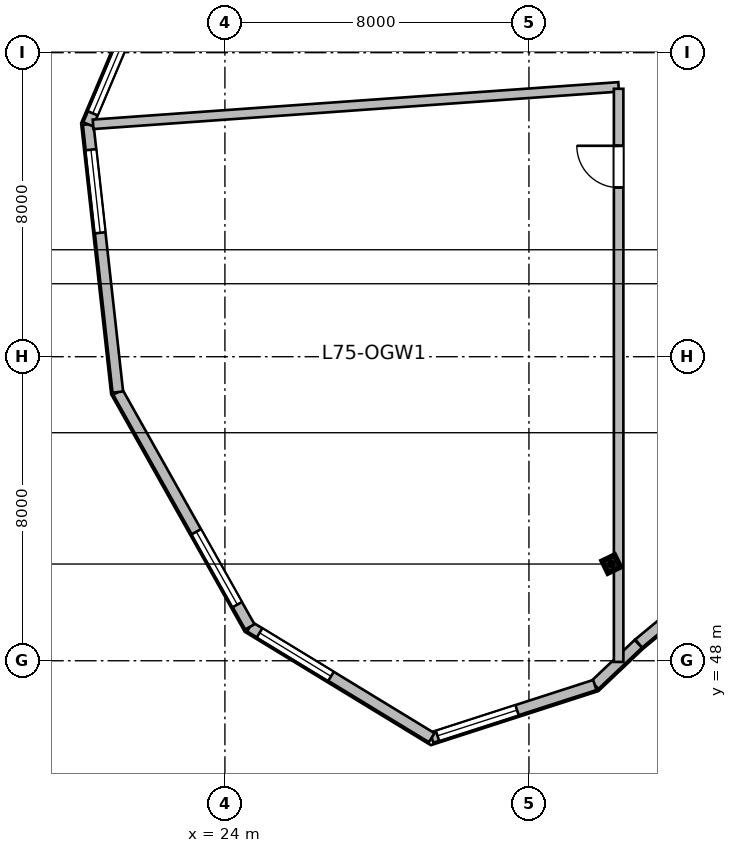
"""IFC4 building model, lengths in metres.
Left out: names, types, materials, properties, quantities, classifications, styles, units other than length and angle.
Written with IfcOpenShell. Run it as: python <this file> out.ifc"""

import sys

from ifc_helpers import new_model, si_unit, direction, frame, frame_2d, origin, origin_2d, place, context, subcontext, project, spatial, rectangle, i_section, extrude, source, transform, mapped, element, fill, save


model = new_model("IFC4")
c1 = context("Model", 3, precision=1e-05, world=origin(), true_north=direction((0.0, 1.0)))
c2 = subcontext(c1, "Body", "Model", "MODEL_VIEW")
j1 = project(units=[si_unit("LENGTHUNIT", "METRE"), si_unit("PLANEANGLEUNIT", "RADIAN")], contexts=[c1])
p1 = place(None, origin())
s1 = spatial("IfcSite", under=j1, at=p1, CompositionType="ELEMENT")
p2 = place(p1, origin())
s2 = spatial("IfcBuilding", under=s1, at=p2, CompositionType="ELEMENT")
p3 = place(p2, frame((0.0, 0.0, 307.8)))
s3 = spatial("IfcBuildingStorey", under=s2, at=p3, CompositionType="ELEMENT", Elevation=307.8)
m1 = source(origin(), c2, "Body", "SweptSolid", [
    extrude(i_section(OverallWidth=0.369, OverallDepth=0.356, WebThickness=0.011, FlangeThickness=0.018, at=origin_2d()), origin(), (0.0, 0.0, 1.0), 4.8),
])
p4 = place(p3, frame((34.166, 50.545, 0.0), z_axis=(0.0, 0.0, 1.0), x_axis=(-0.436173672171, 0.899862504889, 0.0)))
e1 = element("IfcColumn", 1, at=p4, inside=s3, PredefinedType="COLUMN", context=c2, shape_type="MappedRepresentation", body=[
    mapped(m1, transform((0.0, 0.0, 0.0), scale=1.0)),
])
m2 = source(origin(), c2, "Body", "SweptSolid", [
    extrude(rectangle(XDim=1.589, YDim=0.28, at=frame_2d((0.794, 0.0))), origin(), (0.0, 0.0, 1.0), 4.5),
])
p5 = place(p3, frame((36.11, 49.468, 0.0), z_axis=(0.0, 0.0, 1.0), x_axis=(-0.769805836273, -0.63827813251, 0.0)))
e2 = element("IfcWall", 2, at=p5, inside=s3, PredefinedType="SOLIDWALL", context=c2, shape_type="MappedRepresentation", body=[
    mapped(m2, transform((0.0, 0.0, 0.0), scale=1.0)),
])
m3 = source(origin(), c2, "Body", "SweptSolid", [
    extrude(rectangle(XDim=1.577, YDim=0.28, at=frame_2d((0.789, 0.0))), origin(), (0.0, 0.0, 1.0), 4.5),
])
p6 = place(p3, frame((34.878, 48.446, 0.0), z_axis=(0.0, 0.0, 1.0), x_axis=(-0.726119464467, -0.687568558998, 0.0)))
e3 = element("IfcWall", 3, at=p6, inside=s3, PredefinedType="SOLIDWALL", context=c2, shape_type="MappedRepresentation", body=[
    mapped(m3, transform((0.0, 0.0, 0.0), scale=1.0)),
])
m4 = source(origin(), c2, "Body", "SweptSolid", [
    extrude(rectangle(XDim=4.509, YDim=0.28, at=frame_2d((2.255, 0.0))), origin(), (0.0, 0.0, 1.0), 4.5),
])
p7 = place(p3, frame((33.733, 47.361, 0.0), z_axis=(0.0, 0.0, 1.0), x_axis=(-0.95162949292, -0.307247958828, 0.0)))
e4 = element("IfcWall", 4, at=p7, inside=s3, PredefinedType="SOLIDWALL", context=c2, shape_type="MappedRepresentation", body=[
    mapped(m4, transform((0.0, 0.0, 0.0), scale=1.0)),
])
p8 = place(p7, frame((2.149, 0.0, 0.95)))
e5 = element("IfcOpeningElement", 5, at=p8, cuts=e4, PredefinedType="OPENING", context=c2, shape_type="SweptSolid", body=[
    extrude(rectangle(XDim=2.2, YDim=2.1, at=frame_2d((1.1, 1.05))), frame((0.0, 0.15, 0.0), z_axis=(0.0, -1.0, 0.0), x_axis=(1.0, 0.0, 0.0)), (0.0, 0.0, 1.0), 0.3),
])
m5 = source(origin(), c2, "Body", "SweptSolid", [
    extrude(rectangle(XDim=5.604, YDim=0.28, at=frame_2d((2.802, 0.0))), origin(), (0.0, 0.0, 1.0), 4.5),
])
p9 = place(p3, frame((29.442, 45.976, 0.0), z_axis=(0.0, 0.0, 1.0), x_axis=(-0.854002492971, 0.520268913158, 0.0)))
e6 = element("IfcWall", 6, at=p9, inside=s3, PredefinedType="SOLIDWALL", context=c2, shape_type="MappedRepresentation", body=[
    mapped(m5, transform((0.0, 0.0, 0.0), scale=1.0)),
])
p10 = place(p9, frame((3.103, 0.0, 0.95)))
e7 = element("IfcOpeningElement", 7, at=p10, cuts=e6, PredefinedType="OPENING", context=c2, shape_type="SweptSolid", body=[
    extrude(rectangle(XDim=2.2, YDim=2.1, at=frame_2d((1.1, 1.05))), frame((0.0, 0.15, 0.0), z_axis=(0.0, -1.0, 0.0), x_axis=(1.0, 0.0, 0.0)), (0.0, 0.0, 1.0), 0.3),
])
m6 = source(origin(), c2, "Body", "SweptSolid", [
    extrude(rectangle(XDim=7.087, YDim=0.28, at=frame_2d((3.543, 0.0))), origin(), (0.0, 0.0, 1.0), 4.5),
])
p11 = place(p3, frame((24.656, 48.892, 0.0), z_axis=(0.0, 0.0, 1.0), x_axis=(-0.490158199368, 0.871633489256, 0.0)))
e8 = element("IfcWall", 8, at=p11, inside=s3, PredefinedType="SOLIDWALL", context=c2, shape_type="MappedRepresentation", body=[
    mapped(m6, transform((0.0, 0.0, 0.0), scale=1.0)),
])
p12 = place(p11, frame((0.672, 0.0, 0.95)))
e9 = element("IfcOpeningElement", 9, at=p12, cuts=e8, PredefinedType="OPENING", context=c2, shape_type="SweptSolid", body=[
    extrude(rectangle(XDim=2.2, YDim=2.1, at=frame_2d((1.1, 1.05))), frame((0.0, 0.15, 0.0), z_axis=(0.0, -1.0, 0.0), x_axis=(1.0, 0.0, 0.0)), (0.0, 0.0, 1.0), 0.3),
])
m7 = source(origin(), c2, "Body", "SweptSolid", [
    extrude(rectangle(XDim=7.09, YDim=0.28, at=frame_2d((3.545, 0.0))), origin(), (0.0, 0.0, 1.0), 4.5),
])
p13 = place(p3, frame((21.182, 55.069, 0.0), z_axis=(0.0, 0.0, 1.0), x_axis=(-0.110159396922, 0.993913933532, 0.0)))
e10 = element("IfcWall", 10, at=p13, inside=s3, PredefinedType="SOLIDWALL", context=c2, shape_type="MappedRepresentation", body=[
    mapped(m7, transform((0.0, 0.0, 0.0), scale=1.0)),
])
p14 = place(p13, frame((4.217, 0.0, 0.95)))
e11 = element("IfcOpeningElement", 11, at=p14, cuts=e10, PredefinedType="OPENING", context=c2, shape_type="SweptSolid", body=[
    extrude(rectangle(XDim=2.2, YDim=2.1, at=frame_2d((1.1, 1.05))), frame((0.0, 0.15, 0.0), z_axis=(0.0, -1.0, 0.0), x_axis=(1.0, 0.0, 0.0)), (0.0, 0.0, 1.0), 0.3),
])
m8 = source(origin(), c2, "Body", "SweptSolid", [
    extrude(rectangle(XDim=5.655, YDim=0.28, at=frame_2d((2.828, 0.0))), origin(), (0.0, 0.0, 1.0), 4.5),
])
p15 = place(p3, frame((20.401, 62.116, 0.0), z_axis=(0.0, 0.0, 1.0), x_axis=(0.389585063528, 0.920990487614, 0.0)))
e12 = element("IfcWall", 12, at=p15, inside=s3, PredefinedType="SOLIDWALL", context=c2, shape_type="MappedRepresentation", body=[
    mapped(m8, transform((0.0, 0.0, 0.0), scale=1.0)),
])
p16 = place(p15, frame((0.314, 0.0, 0.95)))
e13 = element("IfcOpeningElement", 13, at=p16, cuts=e12, PredefinedType="OPENING", context=c2, shape_type="SweptSolid", body=[
    extrude(rectangle(XDim=2.2, YDim=2.1, at=frame_2d((1.1, 1.05))), frame((0.0, 0.15, 0.0), z_axis=(0.0, -1.0, 0.0), x_axis=(1.0, 0.0, 0.0)), (0.0, 0.0, 1.0), 0.3),
])
m9 = source(origin(), c2, "Body", "SweptSolid", [
    extrude(rectangle(XDim=13.864, YDim=0.25, at=frame_2d((6.932, 0.0))), origin(), (0.0, 0.0, 1.0), 4.5),
])
p17 = place(p3, frame((20.531, 62.115, 0.0), z_axis=(0.0, 0.0, 1.0), x_axis=(0.997472447014, 0.071054327443, 0.0)))
e14 = element("IfcWall", 14, at=p17, inside=s3, PredefinedType="PARTITIONING", context=c2, shape_type="MappedRepresentation", body=[
    mapped(m9, transform((0.0, 0.0, 0.0), scale=1.0)),
])
m10 = source(origin(), c2, "Body", "SweptSolid", [
    extrude(rectangle(XDim=15.081, YDim=0.25, at=frame_2d((7.541, 0.0))), origin(), (0.0, 0.0, 1.0), 4.5),
])
p18 = place(p3, frame((34.36, 47.969, 0.0), z_axis=(0.0, 0.0, 1.0), x_axis=(0.0, 1.0, 0.0)))
e15 = element("IfcWall", 15, at=p18, inside=s3, PredefinedType="PARTITIONING", context=c2, shape_type="MappedRepresentation", body=[
    mapped(m10, transform((0.0, 0.0, 0.0), scale=1.0)),
])
p19 = place(p18, frame((12.481, 0.0, 0.0)))
e16 = element("IfcOpeningElement", 16, at=p19, cuts=e15, PredefinedType="OPENING", context=c2, shape_type="SweptSolid", body=[
    extrude(rectangle(XDim=1.1, YDim=2.15, at=frame_2d((0.55, 1.075))), frame((0.0, 0.135, 0.0), z_axis=(0.0, -1.0, 0.0), x_axis=(1.0, 0.0, 0.0)), (0.0, 0.0, 1.0), 0.27),
])
m11 = source(origin(), c2, "Body", "SweptSolid", [
    extrude(rectangle(XDim=2.2, YDim=2.1, at=frame_2d((1.1, 1.05))), frame((0.0, 0.03, 0.0), z_axis=(0.0, -1.0, 0.0), x_axis=(1.0, 0.0, 0.0)), (0.0, 0.0, 1.0), 0.06),
])
p20 = place(p8, origin())
e17 = element("IfcWindow", 17, at=p20, inside=s3, PartitioningType="TRIPLE_PANEL_VERTICAL", PredefinedType="WINDOW", context=c2, shape_type="MappedRepresentation", body=[
    mapped(m11, transform((0.0, 0.0, 0.0), scale=1.0)),
])
fill(e5, e17)
p21 = place(p10, origin())
e18 = element("IfcWindow", 18, at=p21, inside=s3, PartitioningType="TRIPLE_PANEL_VERTICAL", PredefinedType="WINDOW", context=c2, shape_type="MappedRepresentation", body=[
    mapped(m11, transform((0.0, 0.0, 0.0), scale=1.0)),
])
fill(e7, e18)
p22 = place(p12, origin())
e19 = element("IfcWindow", 19, at=p22, inside=s3, PartitioningType="TRIPLE_PANEL_VERTICAL", PredefinedType="WINDOW", context=c2, shape_type="MappedRepresentation", body=[
    mapped(m11, transform((0.0, 0.0, 0.0), scale=1.0)),
])
fill(e9, e19)
p23 = place(p14, origin())
e20 = element("IfcWindow", 20, at=p23, inside=s3, PartitioningType="TRIPLE_PANEL_VERTICAL", PredefinedType="WINDOW", context=c2, shape_type="MappedRepresentation", body=[
    mapped(m11, transform((0.0, 0.0, 0.0), scale=1.0)),
])
fill(e11, e20)
p24 = place(p16, origin())
e21 = element("IfcWindow", 21, at=p24, inside=s3, PartitioningType="TRIPLE_PANEL_VERTICAL", PredefinedType="WINDOW", context=c2, shape_type="MappedRepresentation", body=[
    mapped(m11, transform((0.0, 0.0, 0.0), scale=1.0)),
])
fill(e13, e21)
m12 = source(origin(), c2, "Body", "SweptSolid", [
    extrude(rectangle(XDim=1.1, YDim=2.15, at=frame_2d((0.55, 1.075))), frame((0.0, 0.025, 0.0), z_axis=(0.0, -1.0, 0.0), x_axis=(1.0, 0.0, 0.0)), (0.0, 0.0, 1.0), 0.05),
])
p25 = place(p19, origin())
e22 = element("IfcDoor", 22, at=p25, inside=s3, OperationType="SINGLE_SWING_RIGHT", PredefinedType="DOOR", context=c2, shape_type="MappedRepresentation", body=[
    mapped(m12, transform((0.0, 0.0, 0.0), scale=1.0)),
])
fill(e16, e22)
save(model, sys.argv[1])
